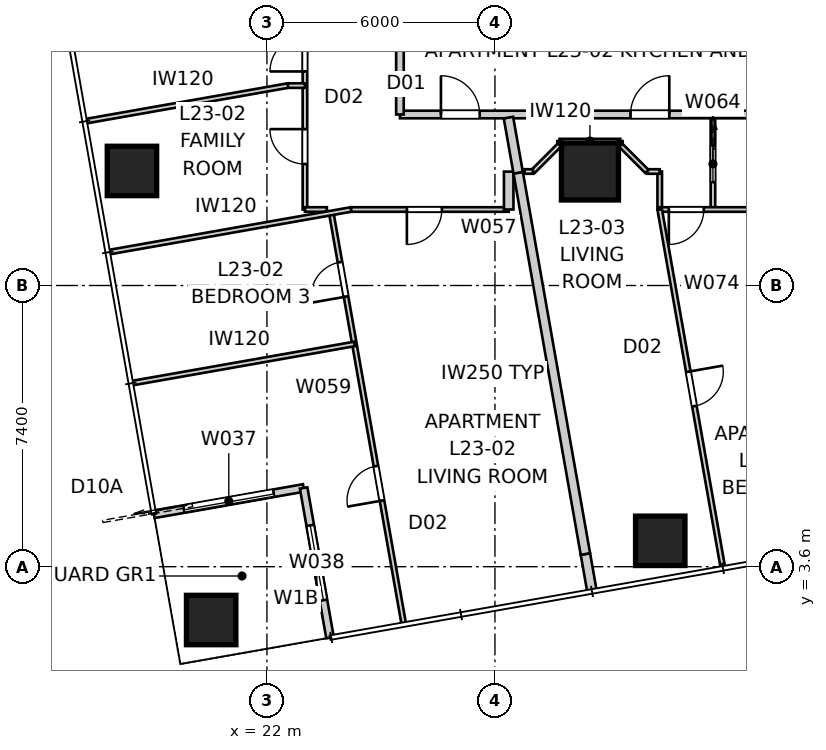
"""IFC4 building model, lengths in metres.
Left out: names, types, materials, properties, quantities, classifications, styles, units other than length and angle.
Written with IfcOpenShell. Run it as: python <this file> out.ifc"""

import sys

from ifc_helpers import new_model, si_unit, direction, frame, frame_2d, origin, origin_2d, place, context, subcontext, project, spatial, rectangle, extrude, element, fill, save


model = new_model("IFC4")
c1 = context("Model", 3, precision=1e-05, world=origin(), true_north=direction((0.0, 1.0)))
c2 = subcontext(c1, "Body", "Model", "MODEL_VIEW")
j1 = project(units=[si_unit("LENGTHUNIT", "METRE"), si_unit("PLANEANGLEUNIT", "RADIAN")], contexts=[c1])
p1 = place(None, origin())
s1 = spatial("IfcSite", under=j1, at=p1, CompositionType="ELEMENT")
p2 = place(p1, origin())
s2 = spatial("IfcBuilding", under=s1, at=p2, CompositionType="ELEMENT")
p3 = place(p2, frame((0.0, 0.0, 86.2)))
s3 = spatial("IfcBuildingStorey", under=s2, at=p3, CompositionType="ELEMENT", Elevation=86.2)
for number, where, z_axis, x_axis in (
    (1, (20.532, 2.197, 0.0), (0.0, 0.0, 1.0), (1.0, 0.0, 0.0)),
    (2, (32.35, 4.281, 0.0), (0.0, 0.0, 1.0), (1.0, 0.0, 0.0)),
    (3, (18.448, 14.015, 0.0), (0.0, 0.0, 1.0), (1.0, 0.0, 0.0)),
):
    element("IfcColumn", number, at=place(p3, frame(where, z_axis=z_axis, x_axis=x_axis)), inside=s3, PredefinedType="COLUMN", context=c2, shape_type="SweptSolid", body=[
        extrude(rectangle(XDim=1.3, YDim=1.3, at=origin_2d()), origin(), (0.0, 0.0, 1.0), 3.4),
    ])
p4 = place(p3, frame((30.5, 14.0, 0.0), z_axis=(0.0, 0.0, 1.0), x_axis=(1.0, 0.0, 0.0)))
e4 = element("IfcColumn", 4, at=p4, inside=s3, PredefinedType="COLUMN", context=c2, shape_type="SweptSolid", body=[
    extrude(rectangle(XDim=1.5, YDim=1.5, at=origin_2d()), origin(), (0.0, 0.0, 1.0), 3.4),
])
p5 = place(p3, frame((19.026, 4.978, 0.0), z_axis=(0.0, 0.0, 1.0), x_axis=(0.984808127031, 0.173646056486, 0.0)))
e5 = element("IfcWall", 5, at=p5, inside=s3, PredefinedType="SOLIDWALL", context=c2, shape_type="SweptSolid", body=[
    extrude(rectangle(XDim=4.0, YDim=0.2, at=frame_2d((2.0, 0.0))), origin(), (0.0, 0.0, 1.0), 3.25),
])
p6 = place(p5, frame((0.8, 0.0, 0.0)))
e6 = element("IfcOpeningElement", 6, at=p6, cuts=e5, PredefinedType="OPENING", context=c2, shape_type="SweptSolid", body=[
    extrude(rectangle(XDim=2.4, YDim=2.1, at=frame_2d((1.2, 1.05))), frame((0.0, 0.11, 0.0), z_axis=(0.0, -1.0, 0.0), x_axis=(1.0, 0.0, 0.0)), (0.0, 0.0, 1.0), 0.22),
])
p7 = place(p3, frame((22.966, 5.672, 0.0), z_axis=(0.0, 0.0, 1.0), x_axis=(0.173646056486, -0.984808127031, 0.0)))
e7 = element("IfcWall", 7, at=p7, inside=s3, PredefinedType="SOLIDWALL", context=c2, shape_type="SweptSolid", body=[
    extrude(rectangle(XDim=4.0, YDim=0.2, at=frame_2d((2.0, 0.0))), origin(), (0.0, 0.0, 1.0), 3.25),
])
p8 = place(p7, frame((1.0, 0.0, 0.45)))
e8 = element("IfcOpeningElement", 8, at=p8, cuts=e7, PredefinedType="OPENING", context=c2, shape_type="SweptSolid", body=[
    extrude(rectangle(XDim=2.0, YDim=1.8, at=frame_2d((1.0, 0.9))), frame((0.0, 0.11, 0.0), z_axis=(0.0, -1.0, 0.0), x_axis=(1.0, 0.0, 0.0)), (0.0, 0.0, 1.0), 0.22),
])
p9 = place(p3, frame((25.5, 15.5, 0.0), z_axis=(0.0, 0.0, 1.0), x_axis=(1.0, 0.0, 0.0)))
e9 = element("IfcWall", 9, at=p9, inside=s3, PredefinedType="PARTITIONING", context=c2, shape_type="SweptSolid", body=[
    extrude(rectangle(XDim=29.0, YDim=0.2, at=frame_2d((14.5, 0.0))), origin(), (0.0, 0.0, 1.0), 3.25),
])
p10 = place(p9, frame((15.794, 0.0, 0.0)))
e10 = element("IfcOpeningElement", 10, at=p10, cuts=e9, PredefinedType="OPENING", context=c2, shape_type="SweptSolid", body=[
    extrude(rectangle(XDim=1.02, YDim=2.34, at=frame_2d((0.51, 1.17))), frame((0.0, 0.11, 0.0), z_axis=(0.0, -1.0, 0.0), x_axis=(1.0, 0.0, 0.0)), (0.0, 0.0, 1.0), 0.22),
])
p11 = place(p9, frame((6.067, 0.0, 0.0)))
e11 = element("IfcOpeningElement", 11, at=p11, cuts=e9, PredefinedType="OPENING", context=c2, shape_type="SweptSolid", body=[
    extrude(rectangle(XDim=1.02, YDim=2.34, at=frame_2d((0.51, 1.17))), frame((0.0, 0.11, 0.0), z_axis=(0.0, -1.0, 0.0), x_axis=(1.0, 0.0, 0.0)), (0.0, 0.0, 1.0), 0.22),
])
p12 = place(p9, frame((1.079, 0.0, 0.0)))
e12 = element("IfcOpeningElement", 12, at=p12, cuts=e9, PredefinedType="OPENING", context=c2, shape_type="SweptSolid", body=[
    extrude(rectangle(XDim=1.02, YDim=2.34, at=frame_2d((0.51, 1.17))), frame((0.0, 0.11, 0.0), z_axis=(0.0, -1.0, 0.0), x_axis=(1.0, 0.0, 0.0)), (0.0, 0.0, 1.0), 0.22),
])
p13 = place(p3, frame((25.5, 44.5, 0.0), z_axis=(0.0, 0.0, 1.0), x_axis=(0.0, -1.0, 0.0)))
e13 = element("IfcWall", 13, at=p13, inside=s3, PredefinedType="PARTITIONING", context=c2, shape_type="SweptSolid", body=[
    extrude(rectangle(XDim=29.0, YDim=0.2, at=frame_2d((14.5, 0.0))), origin(), (0.0, 0.0, 1.0), 3.25),
])
p14 = place(p13, frame((12.263, 0.0, 0.0)))
e14 = element("IfcOpeningElement", 14, at=p14, cuts=e13, PredefinedType="OPENING", context=c2, shape_type="SweptSolid", body=[
    extrude(rectangle(XDim=1.02, YDim=2.34, at=frame_2d((0.51, 1.17))), frame((0.0, 0.11, 0.0), z_axis=(0.0, -1.0, 0.0), x_axis=(1.0, 0.0, 0.0)), (0.0, 0.0, 1.0), 0.22),
])
p15 = place(p13, frame((2.018, 0.0, 0.0)))
e15 = element("IfcOpeningElement", 15, at=p15, cuts=e13, PredefinedType="OPENING", context=c2, shape_type="SweptSolid", body=[
    extrude(rectangle(XDim=1.02, YDim=2.34, at=frame_2d((0.51, 1.17))), frame((0.0, 0.11, 0.0), z_axis=(0.0, -1.0, 0.0), x_axis=(1.0, 0.0, 0.0)), (0.0, 0.0, 1.0), 0.22),
])
p16 = place(p3, frame((30.554, 2.949, 0.0), z_axis=(0.0, 0.0, 1.0), x_axis=(-0.173813186416, 0.984778643263, 0.0)))
e16 = element("IfcWall", 16, at=p16, inside=s3, PredefinedType="PARTITIONING", context=c2, shape_type="SweptSolid", body=[
    extrude(rectangle(XDim=1.0, YDim=0.25, at=frame_2d((0.5, 0.0))), origin(), (0.0, 0.0, 1.0), 3.25),
])
p17 = place(p3, frame((30.38, 3.934, 0.0), z_axis=(0.0, 0.0, 1.0), x_axis=(-0.173644522411, 0.984808397525, 0.0)))
e17 = element("IfcWall", 17, at=p17, inside=s3, PredefinedType="PARTITIONING", context=c2, shape_type="SweptSolid", body=[
    extrude(rectangle(XDim=10.188, YDim=0.25, at=frame_2d((5.094, 0.0))), origin(), (0.0, 0.0, 1.0), 2.638),
])
p18 = place(p3, frame((28.611, 13.967, 0.0), z_axis=(0.0, 0.0, 1.0), x_axis=(-0.173634105885, 0.984810234143, 0.0)))
e18 = element("IfcWall", 18, at=p18, inside=s3, PredefinedType="PARTITIONING", context=c2, shape_type="SweptSolid", body=[
    extrude(rectangle(XDim=1.474, YDim=0.25, at=frame_2d((0.737, 0.0))), origin(), (0.0, 0.0, 1.0), 3.25),
])
p19 = place(p3, frame((23.0, 13.0, 0.0), z_axis=(0.0, 0.0, 1.0), x_axis=(0.0, 1.0, 0.0)))
e19 = element("IfcWall", 19, at=p19, inside=s3, PredefinedType="PARTITIONING", context=c2, shape_type="SweptSolid", body=[
    extrude(rectangle(XDim=34.0, YDim=0.12, at=frame_2d((17.0, 0.0))), origin(), (0.0, 0.0, 1.0), 2.55),
])
p20 = place(p19, frame((18.848, 0.0, 0.0)))
e20 = element("IfcOpeningElement", 20, at=p20, cuts=e19, PredefinedType="OPENING", context=c2, shape_type="SweptSolid", body=[
    extrude(rectangle(XDim=0.92, YDim=2.34, at=frame_2d((0.46, 1.17))), frame((0.0, 0.07, 0.0), z_axis=(0.0, -1.0, 0.0), x_axis=(1.0, 0.0, 0.0)), (0.0, 0.0, 1.0), 0.14),
])
p21 = place(p19, frame((16.284, 0.0, 0.0)))
e21 = element("IfcOpeningElement", 21, at=p21, cuts=e19, PredefinedType="OPENING", context=c2, shape_type="SweptSolid", body=[
    extrude(rectangle(XDim=0.92, YDim=2.34, at=frame_2d((0.46, 1.17))), frame((0.0, 0.07, 0.0), z_axis=(0.0, -1.0, 0.0), x_axis=(1.0, 0.0, 0.0)), (0.0, 0.0, 1.0), 0.14),
])
p22 = place(p19, frame((29.052, 0.0, 0.0)))
e22 = element("IfcOpeningElement", 22, at=p22, cuts=e19, PredefinedType="OPENING", context=c2, shape_type="SweptSolid", body=[
    extrude(rectangle(XDim=0.92, YDim=2.34, at=frame_2d((0.46, 1.17))), frame((0.0, 0.07, 0.0), z_axis=(0.0, -1.0, 0.0), x_axis=(1.0, 0.0, 0.0)), (0.0, 0.0, 1.0), 0.14),
])
p23 = place(p19, frame((1.196, 0.0, 0.0)))
e23 = element("IfcOpeningElement", 23, at=p23, cuts=e19, PredefinedType="OPENING", context=c2, shape_type="SweptSolid", body=[
    extrude(rectangle(XDim=0.92, YDim=2.34, at=frame_2d((0.46, 1.17))), frame((0.0, 0.07, 0.0), z_axis=(0.0, -1.0, 0.0), x_axis=(1.0, 0.0, 0.0)), (0.0, 0.0, 1.0), 0.14),
])
p24 = place(p19, frame((3.633, 0.0, 0.0)))
e24 = element("IfcOpeningElement", 24, at=p24, cuts=e19, PredefinedType="OPENING", context=c2, shape_type="SweptSolid", body=[
    extrude(rectangle(XDim=0.92, YDim=2.34, at=frame_2d((0.46, 1.17))), frame((0.0, 0.07, 0.0), z_axis=(0.0, -1.0, 0.0), x_axis=(1.0, 0.0, 0.0)), (0.0, 0.0, 1.0), 0.14),
])
p25 = place(p19, frame((23.619, 0.0, 0.0)))
e25 = element("IfcOpeningElement", 25, at=p25, cuts=e19, PredefinedType="OPENING", context=c2, shape_type="SweptSolid", body=[
    extrude(rectangle(XDim=0.96, YDim=2.1, at=frame_2d((0.48, 1.05))), frame((0.0, 0.07, 0.0), z_axis=(0.0, -1.0, 0.0), x_axis=(1.0, 0.0, 0.0)), (0.0, 0.0, 1.0), 0.14),
])
p26 = place(p3, frame((28.362, 13.0, 0.0), z_axis=(0.0, 0.0, 1.0), x_axis=(-1.0, 0.0, 0.0)))
e26 = element("IfcWall", 26, at=p26, inside=s3, PredefinedType="PARTITIONING", context=c2, shape_type="SweptSolid", body=[
    extrude(rectangle(XDim=4.151, YDim=0.12, at=frame_2d((2.076, 0.0))), origin(), (0.0, 0.0, 1.0), 2.638),
])
p27 = place(p26, frame((1.76, 0.0, 0.0)))
e27 = element("IfcOpeningElement", 27, at=p27, cuts=e26, PredefinedType="OPENING", context=c2, shape_type="SweptSolid", body=[
    extrude(rectangle(XDim=0.92, YDim=2.34, at=frame_2d((0.46, 1.17))), frame((0.0, 0.07, 0.0), z_axis=(0.0, -1.0, 0.0), x_axis=(1.0, 0.0, 0.0)), (0.0, 0.0, 1.0), 0.14),
])
p28 = place(p3, frame((28.362, 13.998, 0.0), z_axis=(0.0, 0.0, 1.0), x_axis=(0.0, -1.0, 0.0)))
e28 = element("IfcWall", 28, at=p28, inside=s3, PredefinedType="PARTITIONING", context=c2, shape_type="SweptSolid", body=[
    extrude(rectangle(XDim=0.998, YDim=0.25, at=frame_2d((0.499, 0.0))), origin(), (0.0, 0.0, 1.0), 3.25),
])
p29 = place(p3, frame((25.597, 2.115, 0.0), z_axis=(0.0, 0.0, 1.0), x_axis=(-0.173639194339, 0.984809336973, 0.0)))
e29 = element("IfcWall", 29, at=p29, inside=s3, PredefinedType="PARTITIONING", context=c2, shape_type="SweptSolid", body=[
    extrude(rectangle(XDim=10.96, YDim=0.12, at=frame_2d((5.48, 0.0))), origin(), (0.0, 0.0, 1.0), 3.25),
])
p30 = place(p29, frame((3.275, 0.0, 0.0)))
e30 = element("IfcOpeningElement", 30, at=p30, cuts=e29, PredefinedType="OPENING", context=c2, shape_type="SweptSolid", body=[
    extrude(rectangle(XDim=0.92, YDim=2.34, at=frame_2d((0.46, 1.17))), frame((0.0, 0.07, 0.0), z_axis=(0.0, -1.0, 0.0), x_axis=(1.0, 0.0, 0.0)), (0.0, 0.0, 1.0), 0.14),
])
p31 = place(p29, frame((8.725, 0.0, 0.0)))
e31 = element("IfcOpeningElement", 31, at=p31, cuts=e29, PredefinedType="OPENING", context=c2, shape_type="SweptSolid", body=[
    extrude(rectangle(XDim=0.92, YDim=2.34, at=frame_2d((0.46, 1.17))), frame((0.0, 0.07, 0.0), z_axis=(0.0, -1.0, 0.0), x_axis=(1.0, 0.0, 0.0)), (0.0, 0.0, 1.0), 0.14),
])
p32 = place(p3, frame((17.85, 11.878, 0.0), z_axis=(0.0, 0.0, 1.0), x_axis=(0.984806762864, 0.173653792983, 0.0)))
e32 = element("IfcWall", 32, at=p32, inside=s3, PredefinedType="PARTITIONING", context=c2, shape_type="SweptSolid", body=[
    extrude(rectangle(XDim=6.459, YDim=0.12, at=frame_2d((3.229, 0.0))), origin(), (0.0, 0.0, 1.0), 2.638),
])
p33 = place(p3, frame((18.458, 8.432, 0.0), z_axis=(0.0, 0.0, 1.0), x_axis=(0.98480923034, 0.173639799116, 0.0)))
e33 = element("IfcWall", 33, at=p33, inside=s3, PredefinedType="PARTITIONING", context=c2, shape_type="SweptSolid", body=[
    extrude(rectangle(XDim=5.933, YDim=0.12, at=frame_2d((2.967, 0.0))), origin(), (0.0, 0.0, 1.0), 3.25),
])
p34 = place(p3, frame((23.0, 16.261, 0.0), z_axis=(0.0, 0.0, 1.0), x_axis=(-1.0, 0.0, 0.0)))
e34 = element("IfcWall", 34, at=p34, inside=s3, PredefinedType="PARTITIONING", context=c2, shape_type="SweptSolid", body=[
    extrude(rectangle(XDim=0.45, YDim=0.12, at=frame_2d((0.225, 0.0))), origin(), (0.0, 0.0, 1.0), 3.25),
])
p35 = place(p3, frame((22.55, 16.261, 0.0), z_axis=(0.0, 0.0, 1.0), x_axis=(-0.984810453076, -0.173632864151, 0.0)))
e35 = element("IfcWall", 35, at=p35, inside=s3, PredefinedType="PARTITIONING", context=c2, shape_type="SweptSolid", body=[
    extrude(rectangle(XDim=5.389, YDim=0.12, at=frame_2d((2.695, 0.0))), origin(), (0.0, 0.0, 1.0), 3.25),
])
p36 = place(p3, frame((33.736, 15.4, 0.0), z_axis=(0.0, 0.0, 1.0), x_axis=(0.0, -1.0, 0.0)))
e36 = element("IfcWall", 36, at=p36, inside=s3, PredefinedType="PARTITIONING", context=c2, shape_type="SweptSolid", body=[
    extrude(rectangle(XDim=2.4, YDim=0.12, at=frame_2d((1.2, 0.0))), origin(), (0.0, 0.0, 1.0), 3.25),
])
p37 = place(p36, frame((0.72, 0.0, 0.0)))
e37 = element("IfcOpeningElement", 37, at=p37, cuts=e36, PredefinedType="OPENING", context=c2, shape_type="SweptSolid", body=[
    extrude(rectangle(XDim=0.96, YDim=2.1, at=frame_2d((0.48, 1.05))), frame((0.0, 0.07, 0.0), z_axis=(0.0, -1.0, 0.0), x_axis=(1.0, 0.0, 0.0)), (0.0, 0.0, 1.0), 0.14),
])
p38 = place(p3, frame((32.336, 13.0, 0.0), z_axis=(0.0, 0.0, 1.0), x_axis=(0.0, 1.0, 0.0)))
e38 = element("IfcWall", 38, at=p38, inside=s3, PredefinedType="PARTITIONING", context=c2, shape_type="SweptSolid", body=[
    extrude(rectangle(XDim=1.0, YDim=0.12, at=frame_2d((0.5, 0.0))), origin(), (0.0, 0.0, 1.0), 3.25),
])
p39 = place(p3, frame((32.336, 14.0, 0.0), z_axis=(0.0, 0.0, 1.0), x_axis=(-1.0, 0.0, 0.0)))
e39 = element("IfcWall", 39, at=p39, inside=s3, PredefinedType="PARTITIONING", context=c2, shape_type="SweptSolid", body=[
    extrude(rectangle(XDim=0.336, YDim=0.12, at=frame_2d((0.168, 0.0))), origin(), (0.0, 0.0, 1.0), 3.25),
])
p40 = place(p3, frame((32.0, 14.0, 0.0), z_axis=(0.0, 0.0, 1.0), x_axis=(-0.707106781187, 0.707106781187, 0.0)))
e40 = element("IfcWall", 40, at=p40, inside=s3, PredefinedType="PARTITIONING", context=c2, shape_type="SweptSolid", body=[
    extrude(rectangle(XDim=0.99, YDim=0.12, at=frame_2d((0.495, 0.0))), origin(), (0.0, 0.0, 1.0), 3.25),
])
p41 = place(p3, frame((31.3, 14.8, 0.0), z_axis=(0.0, 0.0, 1.0), x_axis=(-1.0, 0.0, 0.0)))
e41 = element("IfcWall", 41, at=p41, inside=s3, PredefinedType="PARTITIONING", context=c2, shape_type="SweptSolid", body=[
    extrude(rectangle(XDim=1.6, YDim=0.12, at=frame_2d((0.8, 0.0))), origin(), (0.0, 0.0, 1.0), 3.25),
])
p42 = place(p3, frame((29.7, 14.7, 0.0), z_axis=(0.0, 0.0, 1.0), x_axis=(-0.707106781187, -0.707106781187, 0.0)))
e42 = element("IfcWall", 42, at=p42, inside=s3, PredefinedType="PARTITIONING", context=c2, shape_type="SweptSolid", body=[
    extrude(rectangle(XDim=0.99, YDim=0.12, at=frame_2d((0.495, 0.0))), origin(), (0.0, 0.0, 1.0), 3.25),
])
p43 = place(p3, frame((29.0, 14.0, 0.0), z_axis=(0.0, 0.0, 1.0), x_axis=(-1.0, 0.0, 0.0)))
e43 = element("IfcWall", 43, at=p43, inside=s3, PredefinedType="PARTITIONING", context=c2, shape_type="SweptSolid", body=[
    extrude(rectangle(XDim=0.219, YDim=0.12, at=frame_2d((0.109, 0.0))), origin(), (0.0, 0.0, 1.0), 3.25),
])
p44 = place(p3, frame((50.105, 13.0, 0.0), z_axis=(0.0, 0.0, 1.0), x_axis=(-1.0, 0.0, 0.0)))
e44 = element("IfcWall", 44, at=p44, inside=s3, PredefinedType="PARTITIONING", context=c2, shape_type="SweptSolid", body=[
    extrude(rectangle(XDim=17.77, YDim=0.12, at=frame_2d((8.885, 0.0))), origin(), (0.0, 0.0, 1.0), 2.55),
])
p45 = place(p44, frame((7.626, 0.0, 0.0)))
e45 = element("IfcOpeningElement", 45, at=p45, cuts=e44, PredefinedType="OPENING", context=c2, shape_type="SweptSolid", body=[
    extrude(rectangle(XDim=0.92, YDim=2.34, at=frame_2d((0.46, 1.17))), frame((0.0, 0.07, 0.0), z_axis=(0.0, -1.0, 0.0), x_axis=(1.0, 0.0, 0.0)), (0.0, 0.0, 1.0), 0.14),
])
p46 = place(p44, frame((16.61, 0.0, 0.0)))
e46 = element("IfcOpeningElement", 46, at=p46, cuts=e44, PredefinedType="OPENING", context=c2, shape_type="SweptSolid", body=[
    extrude(rectangle(XDim=0.92, YDim=2.34, at=frame_2d((0.46, 1.17))), frame((0.0, 0.07, 0.0), z_axis=(0.0, -1.0, 0.0), x_axis=(1.0, 0.0, 0.0)), (0.0, 0.0, 1.0), 0.14),
])
p47 = place(p3, frame((32.336, 13.0, 0.0), z_axis=(0.0, 0.0, 1.0), x_axis=(0.173624894944, -0.984811858101, 0.0)))
e47 = element("IfcWall", 47, at=p47, inside=s3, PredefinedType="PARTITIONING", context=c2, shape_type="SweptSolid", body=[
    extrude(rectangle(XDim=9.549, YDim=0.12, at=frame_2d((4.774, 0.0))), origin(), (0.0, 0.0, 1.0), 3.25),
])
p48 = place(p47, frame((4.334, 0.0, 0.0)))
e48 = element("IfcOpeningElement", 48, at=p48, cuts=e47, PredefinedType="OPENING", context=c2, shape_type="SweptSolid", body=[
    extrude(rectangle(XDim=0.92, YDim=2.34, at=frame_2d((0.46, 1.17))), frame((0.0, 0.07, 0.0), z_axis=(0.0, -1.0, 0.0), x_axis=(1.0, 0.0, 0.0)), (0.0, 0.0, 1.0), 0.14),
])
p49 = place(p3, frame((23.0, 13.0, 0.0), z_axis=(0.0, 0.0, 1.0), x_axis=(1.0, 0.0, 0.0)))
e49 = element("IfcWall", 49, at=p49, inside=s3, PredefinedType="PARTITIONING", context=c2, shape_type="SweptSolid", body=[
    extrude(rectangle(XDim=0.578, YDim=0.12, at=frame_2d((0.289, 0.0))), origin(), (0.0, 0.0, 1.0), 3.25),
])
for number, where, z_axis, x_axis in (
    (50, (31.3, 14.8, 0.0), (0.0, 0.0, 1.0), (0.0, -1.0, 0.0)),
    (51, (29.7, 14.8, 0.0), (0.0, 0.0, 1.0), (0.0, -1.0, 0.0)),
):
    element("IfcWall", number, at=place(p3, frame(where, z_axis=z_axis, x_axis=x_axis)), inside=s3, PredefinedType="PARTITIONING", context=c2, shape_type="SweptSolid", body=[
        extrude(rectangle(XDim=0.1, YDim=0.12, at=frame_2d((0.05, 0.0))), origin(), (0.0, 0.0, 1.0), 3.25),
    ])
p50 = place(p6, origin())
e52 = element("IfcDoor", 52, at=p50, inside=s3, OperationType="SLIDING_TO_LEFT", PredefinedType="DOOR", context=c2, shape_type="SweptSolid", body=[
    extrude(rectangle(XDim=2.4, YDim=2.1, at=frame_2d((1.2, 1.05))), frame((0.0, 0.025, 0.0), z_axis=(0.0, -1.0, 0.0), x_axis=(1.0, 0.0, 0.0)), (0.0, 0.0, 1.0), 0.05),
])
fill(e6, e52)
p51 = place(p8, origin())
e53 = element("IfcWindow", 53, at=p51, inside=s3, PartitioningType="SINGLE_PANEL", PredefinedType="WINDOW", context=c2, shape_type="SweptSolid", body=[
    extrude(rectangle(XDim=2.0, YDim=1.8, at=frame_2d((1.0, 0.9))), frame((0.0, 0.03, 0.0), z_axis=(0.0, -1.0, 0.0), x_axis=(1.0, 0.0, 0.0)), (0.0, 0.0, 1.0), 0.06),
])
fill(e8, e53)
p52 = place(p11, origin())
e54 = element("IfcDoor", 54, at=p52, inside=s3, OperationType="SINGLE_SWING_RIGHT", PredefinedType="DOOR", context=c2, shape_type="SweptSolid", body=[
    extrude(rectangle(XDim=1.02, YDim=2.34, at=frame_2d((0.51, 1.17))), frame((0.0, 0.025, 0.0), z_axis=(0.0, -1.0, 0.0), x_axis=(1.0, 0.0, 0.0)), (0.0, 0.0, 1.0), 0.05),
])
fill(e11, e54)
p53 = place(p12, origin())
e55 = element("IfcDoor", 55, at=p53, inside=s3, OperationType="SINGLE_SWING_LEFT", PredefinedType="DOOR", context=c2, shape_type="SweptSolid", body=[
    extrude(rectangle(XDim=1.02, YDim=2.34, at=frame_2d((0.51, 1.17))), frame((0.0, 0.025, 0.0), z_axis=(0.0, -1.0, 0.0), x_axis=(1.0, 0.0, 0.0)), (0.0, 0.0, 1.0), 0.05),
])
fill(e12, e55)
p54 = place(p37, origin())
e56 = element("IfcDoor", 56, at=p54, inside=s3, OperationType="SLIDING_TO_LEFT", PredefinedType="DOOR", context=c2, shape_type="SweptSolid", body=[
    extrude(rectangle(XDim=0.96, YDim=2.1, at=frame_2d((0.48, 1.05))), frame((0.0, 0.025, 0.0), z_axis=(0.0, -1.0, 0.0), x_axis=(1.0, 0.0, 0.0)), (0.0, 0.0, 1.0), 0.05),
])
fill(e37, e56)
p55 = place(p46, origin())
e57 = element("IfcDoor", 57, at=p55, inside=s3, OperationType="SINGLE_SWING_RIGHT", PredefinedType="DOOR", context=c2, shape_type="SweptSolid", body=[
    extrude(rectangle(XDim=0.92, YDim=2.34, at=frame_2d((0.46, 1.17))), frame((0.0, 0.025, 0.0), z_axis=(0.0, -1.0, 0.0), x_axis=(1.0, 0.0, 0.0)), (0.0, 0.0, 1.0), 0.05),
])
fill(e46, e57)
p56 = place(p27, origin())
e58 = element("IfcDoor", 58, at=p56, inside=s3, OperationType="SINGLE_SWING_RIGHT", PredefinedType="DOOR", context=c2, shape_type="SweptSolid", body=[
    extrude(rectangle(XDim=0.92, YDim=2.34, at=frame_2d((0.46, 1.17))), frame((0.0, 0.025, 0.0), z_axis=(0.0, -1.0, 0.0), x_axis=(1.0, 0.0, 0.0)), (0.0, 0.0, 1.0), 0.05),
])
fill(e27, e58)
p57 = place(p23, origin())
e59 = element("IfcDoor", 59, at=p57, inside=s3, OperationType="SINGLE_SWING_RIGHT", PredefinedType="DOOR", context=c2, shape_type="SweptSolid", body=[
    extrude(rectangle(XDim=0.92, YDim=2.34, at=frame_2d((0.46, 1.17))), frame((0.0, 0.025, 0.0), z_axis=(0.0, -1.0, 0.0), x_axis=(1.0, 0.0, 0.0)), (0.0, 0.0, 1.0), 0.05),
])
fill(e23, e59)
p58 = place(p24, origin())
e60 = element("IfcDoor", 60, at=p58, inside=s3, OperationType="SINGLE_SWING_LEFT", PredefinedType="DOOR", context=c2, shape_type="SweptSolid", body=[
    extrude(rectangle(XDim=0.92, YDim=2.34, at=frame_2d((0.46, 1.17))), frame((0.0, 0.025, 0.0), z_axis=(0.0, -1.0, 0.0), x_axis=(1.0, 0.0, 0.0)), (0.0, 0.0, 1.0), 0.05),
])
fill(e24, e60)
p59 = place(p30, origin())
e61 = element("IfcDoor", 61, at=p59, inside=s3, OperationType="SINGLE_SWING_LEFT", PredefinedType="DOOR", context=c2, shape_type="SweptSolid", body=[
    extrude(rectangle(XDim=0.92, YDim=2.34, at=frame_2d((0.46, 1.17))), frame((0.0, 0.025, 0.0), z_axis=(0.0, -1.0, 0.0), x_axis=(1.0, 0.0, 0.0)), (0.0, 0.0, 1.0), 0.05),
])
fill(e30, e61)
p60 = place(p31, origin())
e62 = element("IfcDoor", 62, at=p60, inside=s3, OperationType="SINGLE_SWING_LEFT", PredefinedType="DOOR", context=c2, shape_type="SweptSolid", body=[
    extrude(rectangle(XDim=0.92, YDim=2.34, at=frame_2d((0.46, 1.17))), frame((0.0, 0.025, 0.0), z_axis=(0.0, -1.0, 0.0), x_axis=(1.0, 0.0, 0.0)), (0.0, 0.0, 1.0), 0.05),
])
fill(e31, e62)
p61 = place(p48, origin())
e63 = element("IfcDoor", 63, at=p61, inside=s3, OperationType="SINGLE_SWING_LEFT", PredefinedType="DOOR", context=c2, shape_type="SweptSolid", body=[
    extrude(rectangle(XDim=0.92, YDim=2.34, at=frame_2d((0.46, 1.17))), frame((0.0, 0.025, 0.0), z_axis=(0.0, -1.0, 0.0), x_axis=(1.0, 0.0, 0.0)), (0.0, 0.0, 1.0), 0.05),
])
fill(e48, e63)
save(model, sys.argv[1])
